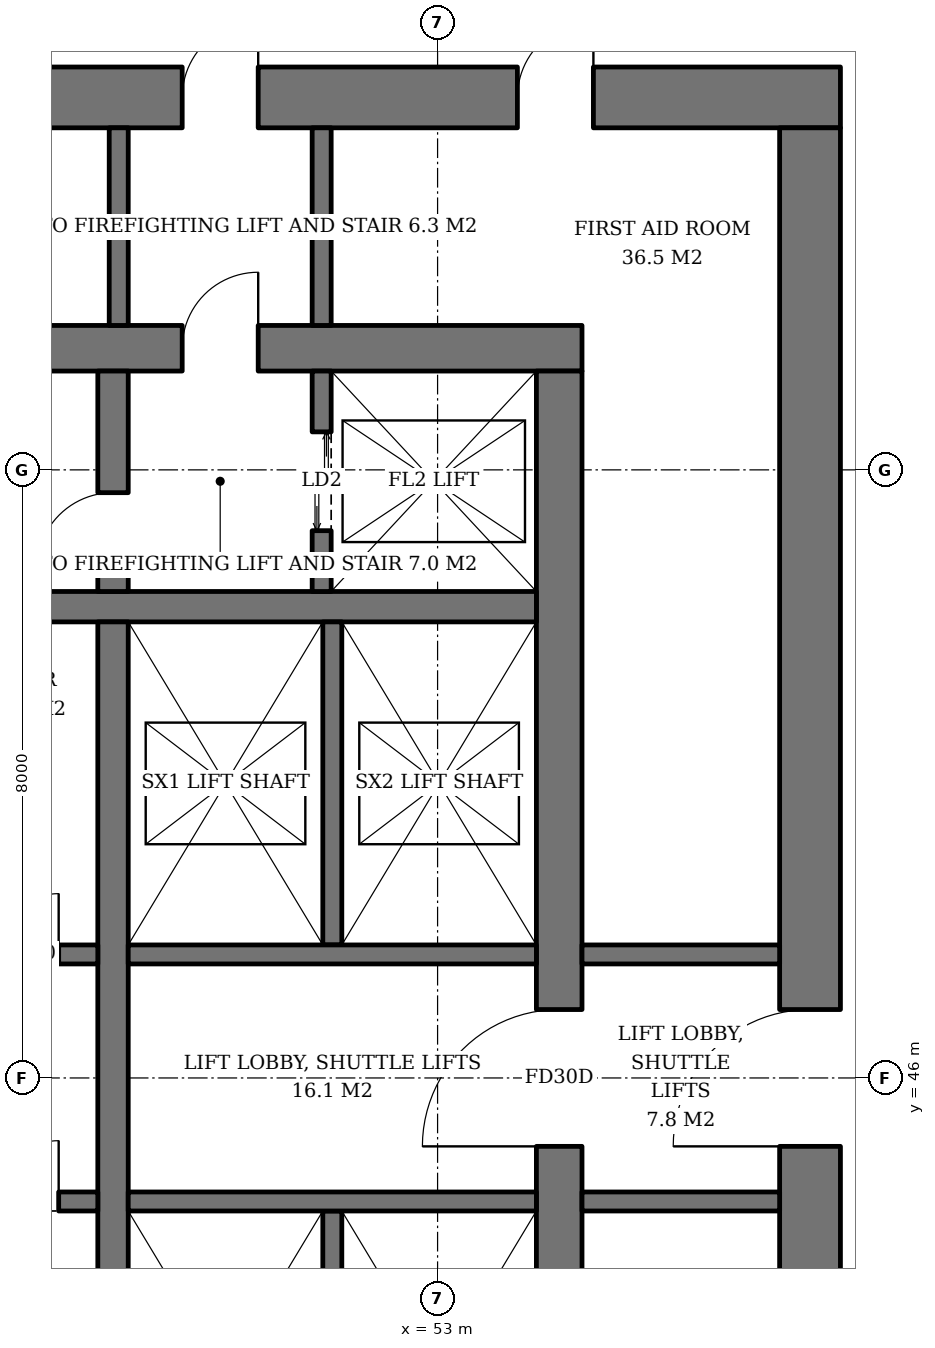
"""IFC4 building model, lengths in metres.
Left out: names, types, materials, properties, quantities, classifications, styles, units other than length and angle.
Written with IfcOpenShell. Run it as: python <this file> out.ifc"""

import sys

from ifc_helpers import new_model, si_unit, direction, frame, frame_2d, origin, place, context, subcontext, project, spatial, rectangle, extrude, element, fill, save


model = new_model("IFC4")
c1 = context("Model", 3, precision=1e-05, world=origin(), true_north=direction((0.0, 1.0)))
c2 = subcontext(c1, "Body", "Model", "MODEL_VIEW")
j1 = project(units=[si_unit("LENGTHUNIT", "METRE"), si_unit("PLANEANGLEUNIT", "RADIAN")], contexts=[c1])
p1 = place(None, origin())
s1 = spatial("IfcSite", under=j1, at=p1, CompositionType="ELEMENT")
p2 = place(p1, origin())
s2 = spatial("IfcBuilding", under=s1, at=p2, CompositionType="ELEMENT")
p3 = place(p2, frame((0.0, 0.0, 78.0)))
s3 = spatial("IfcBuildingStorey", under=s2, at=p3, CompositionType="ELEMENT", Elevation=78.0)
p4 = place(p3, frame((35.1, 55.6, 0.0), z_axis=(0.0, 0.0, 1.0), x_axis=(1.0, 0.0, 0.0)))
e1 = element("IfcWall", 1, at=p4, inside=s3, PredefinedType="SHEAR", context=c2, shape_type="SweptSolid", body=[
    extrude(rectangle(XDim=19.8, YDim=0.6, at=frame_2d((9.9, 0.0))), origin(), (0.0, 0.0, 1.0), 3.8),
])
p5 = place(p4, frame((14.54, 0.0, 0.0)))
e2 = element("IfcOpeningElement", 2, at=p5, cuts=e1, PredefinedType="OPENING", context=c2, shape_type="SweptSolid", body=[
    extrude(rectangle(XDim=1.0, YDim=2.1, at=frame_2d((0.5, 1.05))), frame((0.0, 0.31, 0.0), z_axis=(0.0, -1.0, 0.0), x_axis=(1.0, 0.0, 0.0)), (0.0, 0.0, 1.0), 0.62),
])
p6 = place(p4, frame((2.425, 0.0, 0.0)))
e3 = element("IfcOpeningElement", 3, at=p6, cuts=e1, PredefinedType="OPENING", context=c2, shape_type="SweptSolid", body=[
    extrude(rectangle(XDim=1.0, YDim=2.1, at=frame_2d((0.5, 1.05))), frame((0.0, 0.31, 0.0), z_axis=(0.0, -1.0, 0.0), x_axis=(1.0, 0.0, 0.0)), (0.0, 0.0, 1.0), 0.62),
])
p7 = place(p3, frame((54.6, 36.7, 0.0), z_axis=(0.0, 0.0, 1.0), x_axis=(0.0, 1.0, 0.0)))
e4 = element("IfcWall", 4, at=p7, inside=s3, PredefinedType="SHEAR", context=c2, shape_type="SweptSolid", body=[
    extrude(rectangle(XDim=18.6, YDim=0.6, at=frame_2d((9.3, 0.0))), origin(), (0.0, 0.0, 1.0), 3.8),
])
p8 = place(p7, frame((8.4, 0.0, 0.0)))
e5 = element("IfcOpeningElement", 5, at=p8, cuts=e4, PredefinedType="OPENING", context=c2, shape_type="SweptSolid", body=[
    extrude(rectangle(XDim=1.8, YDim=2.4, at=frame_2d((0.9, 1.2))), frame((0.0, 0.31, 0.0), z_axis=(0.0, -1.0, 0.0), x_axis=(1.0, 0.0, 0.0)), (0.0, 0.0, 1.0), 0.62),
])
p9 = place(p3, frame((31.7, 58.9, 0.0), z_axis=(0.0, 0.0, 1.0), x_axis=(1.0, 0.0, 0.0)))
e6 = element("IfcWall", 6, at=p9, inside=s3, PredefinedType="SHEAR", context=c2, shape_type="SweptSolid", body=[
    extrude(rectangle(XDim=26.6, YDim=0.8, at=frame_2d((13.3, 0.0))), origin(), (0.0, 0.0, 1.0), 3.8),
])
p10 = place(p9, frame((17.94, 0.0, 0.0)))
e7 = element("IfcOpeningElement", 7, at=p10, cuts=e6, PredefinedType="OPENING", context=c2, shape_type="SweptSolid", body=[
    extrude(rectangle(XDim=1.0, YDim=2.1, at=frame_2d((0.5, 1.05))), frame((0.0, 0.41, 0.0), z_axis=(0.0, -1.0, 0.0), x_axis=(1.0, 0.0, 0.0)), (0.0, 0.0, 1.0), 0.82),
])
p11 = place(p9, frame((5.825, 0.0, 0.0)))
e8 = element("IfcOpeningElement", 8, at=p11, cuts=e6, PredefinedType="OPENING", context=c2, shape_type="SweptSolid", body=[
    extrude(rectangle(XDim=1.0, YDim=2.1, at=frame_2d((0.5, 1.05))), frame((0.0, 0.41, 0.0), z_axis=(0.0, -1.0, 0.0), x_axis=(1.0, 0.0, 0.0)), (0.0, 0.0, 1.0), 0.82),
])
p12 = place(p9, frame((1.05, 0.0, 0.0)))
e9 = element("IfcOpeningElement", 9, at=p12, cuts=e6, PredefinedType="OPENING", context=c2, shape_type="SweptSolid", body=[
    extrude(rectangle(XDim=1.0, YDim=2.1, at=frame_2d((0.5, 1.05))), frame((0.0, 0.41, 0.0), z_axis=(0.0, -1.0, 0.0), x_axis=(1.0, 0.0, 0.0)), (0.0, 0.0, 1.0), 0.82),
])
p13 = place(p9, frame((2.637, 0.0, 0.0)))
e10 = element("IfcOpeningElement", 10, at=p13, cuts=e6, PredefinedType="OPENING", context=c2, shape_type="SweptSolid", body=[
    extrude(rectangle(XDim=1.0, YDim=2.1, at=frame_2d((0.5, 1.05))), frame((0.0, 0.41, 0.0), z_axis=(0.0, -1.0, 0.0), x_axis=(1.0, 0.0, 0.0)), (0.0, 0.0, 1.0), 0.82),
])
p14 = place(p9, frame((4.229, 0.0, 0.0)))
e11 = element("IfcOpeningElement", 11, at=p14, cuts=e6, PredefinedType="OPENING", context=c2, shape_type="SweptSolid", body=[
    extrude(rectangle(XDim=1.0, YDim=2.1, at=frame_2d((0.5, 1.05))), frame((0.0, 0.41, 0.0), z_axis=(0.0, -1.0, 0.0), x_axis=(1.0, 0.0, 0.0)), (0.0, 0.0, 1.0), 0.82),
])
p15 = place(p9, frame((8.44, 0.0, 0.0)))
e12 = element("IfcOpeningElement", 12, at=p15, cuts=e6, PredefinedType="OPENING", context=c2, shape_type="SweptSolid", body=[
    extrude(rectangle(XDim=1.0, YDim=2.1, at=frame_2d((0.5, 1.05))), frame((0.0, 0.41, 0.0), z_axis=(0.0, -1.0, 0.0), x_axis=(1.0, 0.0, 0.0)), (0.0, 0.0, 1.0), 0.82),
])
p16 = place(p9, frame((13.342, 0.0, 0.0)))
e13 = element("IfcOpeningElement", 13, at=p16, cuts=e6, PredefinedType="OPENING", context=c2, shape_type="SweptSolid", body=[
    extrude(rectangle(XDim=1.0, YDim=2.1, at=frame_2d((0.5, 1.05))), frame((0.0, 0.41, 0.0), z_axis=(0.0, -1.0, 0.0), x_axis=(1.0, 0.0, 0.0)), (0.0, 0.0, 1.0), 0.82),
])
p17 = place(p9, frame((22.35, 0.0, 0.0)))
e14 = element("IfcOpeningElement", 14, at=p17, cuts=e6, PredefinedType="OPENING", context=c2, shape_type="SweptSolid", body=[
    extrude(rectangle(XDim=1.0, YDim=2.1, at=frame_2d((0.5, 1.05))), frame((0.0, 0.41, 0.0), z_axis=(0.0, -1.0, 0.0), x_axis=(1.0, 0.0, 0.0)), (0.0, 0.0, 1.0), 0.82),
])
p18 = place(p3, frame((57.9, 33.5, 0.0), z_axis=(0.0, 0.0, 1.0), x_axis=(0.0, 1.0, 0.0)))
e15 = element("IfcWall", 15, at=p18, inside=s3, PredefinedType="SHEAR", context=c2, shape_type="SweptSolid", body=[
    extrude(rectangle(XDim=25.0, YDim=0.8, at=frame_2d((12.5, 0.0))), origin(), (0.0, 0.0, 1.0), 3.8),
])
p19 = place(p18, frame((11.6, 0.0, 0.0)))
e16 = element("IfcOpeningElement", 16, at=p19, cuts=e15, PredefinedType="OPENING", context=c2, shape_type="SweptSolid", body=[
    extrude(rectangle(XDim=1.8, YDim=2.4, at=frame_2d((0.9, 1.2))), frame((0.0, 0.41, 0.0), z_axis=(0.0, -1.0, 0.0), x_axis=(1.0, 0.0, 0.0)), (0.0, 0.0, 1.0), 0.82),
])
p20 = place(p3, frame((35.7, 52.2, 0.0), z_axis=(0.0, 0.0, 1.0), x_axis=(1.0, 0.0, 0.0)))
e17 = element("IfcWall", 17, at=p20, inside=s3, PredefinedType="SHEAR", context=c2, shape_type="SweptSolid", body=[
    extrude(rectangle(XDim=18.6, YDim=0.4, at=frame_2d((9.3, 0.0))), origin(), (0.0, 0.0, 1.0), 3.8),
])
p21 = place(p3, frame((48.73, 40.0, 0.0), z_axis=(0.0, 0.0, 1.0), x_axis=(0.0, 1.0, 0.0)))
e18 = element("IfcWall", 18, at=p21, inside=s3, PredefinedType="SHEAR", context=c2, shape_type="SweptSolid", body=[
    extrude(rectangle(XDim=12.0, YDim=0.4, at=frame_2d((6.0, 0.0))), origin(), (0.0, 0.0, 1.0), 3.8),
])
p22 = place(p3, frame((48.73, 52.4, 0.0), z_axis=(0.0, 0.0, 1.0), x_axis=(0.0, 1.0, 0.0)))
e19 = element("IfcWall", 19, at=p22, inside=s3, PredefinedType="SHEAR", context=c2, shape_type="SweptSolid", body=[
    extrude(rectangle(XDim=2.9, YDim=0.4, at=frame_2d((1.45, 0.0))), origin(), (0.0, 0.0, 1.0), 3.8),
])
p23 = place(p22, frame((0.3, 0.0, 0.0)))
e20 = element("IfcOpeningElement", 20, at=p23, cuts=e19, PredefinedType="OPENING", context=c2, shape_type="SweptSolid", body=[
    extrude(rectangle(XDim=1.0, YDim=2.1, at=frame_2d((0.5, 1.05))), frame((0.0, 0.21, 0.0), z_axis=(0.0, -1.0, 0.0), x_axis=(1.0, 0.0, 0.0)), (0.0, 0.0, 1.0), 0.42),
])
p24 = place(p3, frame((51.475, 52.4, 0.0), z_axis=(0.0, 0.0, 1.0), x_axis=(0.0, 1.0, 0.0)))
e21 = element("IfcWall", 21, at=p24, inside=s3, PredefinedType="SHEAR", context=c2, shape_type="SweptSolid", body=[
    extrude(rectangle(XDim=2.9, YDim=0.25, at=frame_2d((1.45, 0.0))), origin(), (0.0, 0.0, 1.0), 3.8),
])
p25 = place(p24, frame((0.8, 0.0, 0.0)))
e22 = element("IfcOpeningElement", 22, at=p25, cuts=e21, PredefinedType="OPENING", context=c2, shape_type="SweptSolid", body=[
    extrude(rectangle(XDim=1.3, YDim=2.2, at=frame_2d((0.65, 1.1))), frame((0.0, 0.135, 0.0), z_axis=(0.0, -1.0, 0.0), x_axis=(1.0, 0.0, 0.0)), (0.0, 0.0, 1.0), 0.27),
])
p26 = place(p3, frame((35.7, 47.625, 0.0), z_axis=(0.0, 0.0, 1.0), x_axis=(1.0, 0.0, 0.0)))
e23 = element("IfcWall", 23, at=p26, inside=s3, PredefinedType="SHEAR", context=c2, shape_type="SweptSolid", body=[
    extrude(rectangle(XDim=12.83, YDim=0.25, at=frame_2d((6.415, 0.0))), origin(), (0.0, 0.0, 1.0), 3.8),
])
p27 = place(p26, frame((0.7, 0.0, 0.0)))
e24 = element("IfcOpeningElement", 24, at=p27, cuts=e23, PredefinedType="OPENING", context=c2, shape_type="SweptSolid", body=[
    extrude(rectangle(XDim=1.1, YDim=2.2, at=frame_2d((0.55, 1.1))), frame((0.0, 0.135, 0.0), z_axis=(0.0, -1.0, 0.0), x_axis=(1.0, 0.0, 0.0)), (0.0, 0.0, 1.0), 0.27),
])
p28 = place(p26, frame((3.45, 0.0, 0.0)))
e25 = element("IfcOpeningElement", 25, at=p28, cuts=e23, PredefinedType="OPENING", context=c2, shape_type="SweptSolid", body=[
    extrude(rectangle(XDim=1.1, YDim=2.2, at=frame_2d((0.55, 1.1))), frame((0.0, 0.135, 0.0), z_axis=(0.0, -1.0, 0.0), x_axis=(1.0, 0.0, 0.0)), (0.0, 0.0, 1.0), 0.27),
])
p29 = place(p26, frame((6.2, 0.0, 0.0)))
e26 = element("IfcOpeningElement", 26, at=p29, cuts=e23, PredefinedType="OPENING", context=c2, shape_type="SweptSolid", body=[
    extrude(rectangle(XDim=1.1, YDim=2.2, at=frame_2d((0.55, 1.1))), frame((0.0, 0.135, 0.0), z_axis=(0.0, -1.0, 0.0), x_axis=(1.0, 0.0, 0.0)), (0.0, 0.0, 1.0), 0.27),
])
p30 = place(p26, frame((8.95, 0.0, 0.0)))
e27 = element("IfcOpeningElement", 27, at=p30, cuts=e23, PredefinedType="OPENING", context=c2, shape_type="SweptSolid", body=[
    extrude(rectangle(XDim=1.1, YDim=2.2, at=frame_2d((0.55, 1.1))), frame((0.0, 0.135, 0.0), z_axis=(0.0, -1.0, 0.0), x_axis=(1.0, 0.0, 0.0)), (0.0, 0.0, 1.0), 0.27),
])
p31 = place(p26, frame((11.515, 0.0, 0.0)))
e28 = element("IfcOpeningElement", 28, at=p31, cuts=e23, PredefinedType="OPENING", context=c2, shape_type="SweptSolid", body=[
    extrude(rectangle(XDim=0.8, YDim=2.0, at=frame_2d((0.4, 1.0))), frame((0.0, 0.135, 0.0), z_axis=(0.0, -1.0, 0.0), x_axis=(1.0, 0.0, 0.0)), (0.0, 0.0, 1.0), 0.27),
])
p32 = place(p3, frame((35.7, 44.375, 0.0), z_axis=(0.0, 0.0, 1.0), x_axis=(1.0, 0.0, 0.0)))
e29 = element("IfcWall", 29, at=p32, inside=s3, PredefinedType="SHEAR", context=c2, shape_type="SweptSolid", body=[
    extrude(rectangle(XDim=12.83, YDim=0.25, at=frame_2d((6.415, 0.0))), origin(), (0.0, 0.0, 1.0), 3.8),
])
p33 = place(p32, frame((0.7, 0.0, 0.0)))
e30 = element("IfcOpeningElement", 30, at=p33, cuts=e29, PredefinedType="OPENING", context=c2, shape_type="SweptSolid", body=[
    extrude(rectangle(XDim=1.1, YDim=2.2, at=frame_2d((0.55, 1.1))), frame((0.0, 0.135, 0.0), z_axis=(0.0, -1.0, 0.0), x_axis=(1.0, 0.0, 0.0)), (0.0, 0.0, 1.0), 0.27),
])
p34 = place(p32, frame((3.45, 0.0, 0.0)))
e31 = element("IfcOpeningElement", 31, at=p34, cuts=e29, PredefinedType="OPENING", context=c2, shape_type="SweptSolid", body=[
    extrude(rectangle(XDim=1.1, YDim=2.2, at=frame_2d((0.55, 1.1))), frame((0.0, 0.135, 0.0), z_axis=(0.0, -1.0, 0.0), x_axis=(1.0, 0.0, 0.0)), (0.0, 0.0, 1.0), 0.27),
])
p35 = place(p32, frame((6.2, 0.0, 0.0)))
e32 = element("IfcOpeningElement", 32, at=p35, cuts=e29, PredefinedType="OPENING", context=c2, shape_type="SweptSolid", body=[
    extrude(rectangle(XDim=1.1, YDim=2.2, at=frame_2d((0.55, 1.1))), frame((0.0, 0.135, 0.0), z_axis=(0.0, -1.0, 0.0), x_axis=(1.0, 0.0, 0.0)), (0.0, 0.0, 1.0), 0.27),
])
p36 = place(p32, frame((8.95, 0.0, 0.0)))
e33 = element("IfcOpeningElement", 33, at=p36, cuts=e29, PredefinedType="OPENING", context=c2, shape_type="SweptSolid", body=[
    extrude(rectangle(XDim=1.1, YDim=2.2, at=frame_2d((0.55, 1.1))), frame((0.0, 0.135, 0.0), z_axis=(0.0, -1.0, 0.0), x_axis=(1.0, 0.0, 0.0)), (0.0, 0.0, 1.0), 0.27),
])
p37 = place(p32, frame((11.515, 0.0, 0.0)))
e34 = element("IfcOpeningElement", 34, at=p37, cuts=e29, PredefinedType="OPENING", context=c2, shape_type="SweptSolid", body=[
    extrude(rectangle(XDim=0.8, YDim=2.0, at=frame_2d((0.4, 1.0))), frame((0.0, 0.135, 0.0), z_axis=(0.0, -1.0, 0.0), x_axis=(1.0, 0.0, 0.0)), (0.0, 0.0, 1.0), 0.27),
])
p38 = place(p3, frame((51.615, 47.75, 0.0), z_axis=(0.0, 0.0, 1.0), x_axis=(0.0, 1.0, 0.0)))
e35 = element("IfcWall", 35, at=p38, inside=s3, PredefinedType="SHEAR", context=c2, shape_type="SweptSolid", body=[
    extrude(rectangle(XDim=4.25, YDim=0.25, at=frame_2d((2.125, 0.0))), origin(), (0.0, 0.0, 1.0), 3.8),
])
p39 = place(p3, frame((48.93, 47.625, 0.0), z_axis=(0.0, 0.0, 1.0), x_axis=(1.0, 0.0, 0.0)))
e36 = element("IfcWall", 36, at=p39, inside=s3, PredefinedType="SHEAR", context=c2, shape_type="SweptSolid", body=[
    extrude(rectangle(XDim=5.37, YDim=0.25, at=frame_2d((2.685, 0.0))), origin(), (0.0, 0.0, 1.0), 3.8),
])
p40 = place(p3, frame((51.615, 44.25, 0.0), z_axis=(0.0, 0.0, 1.0), x_axis=(0.0, -1.0, 0.0)))
e37 = element("IfcWall", 37, at=p40, inside=s3, PredefinedType="SHEAR", context=c2, shape_type="SweptSolid", body=[
    extrude(rectangle(XDim=4.25, YDim=0.25, at=frame_2d((2.125, 0.0))), origin(), (0.0, 0.0, 1.0), 3.8),
])
p41 = place(p3, frame((48.93, 44.375, 0.0), z_axis=(0.0, 0.0, 1.0), x_axis=(1.0, 0.0, 0.0)))
e38 = element("IfcWall", 38, at=p41, inside=s3, PredefinedType="SHEAR", context=c2, shape_type="SweptSolid", body=[
    extrude(rectangle(XDim=5.37, YDim=0.25, at=frame_2d((2.685, 0.0))), origin(), (0.0, 0.0, 1.0), 3.8),
])
for number, where, z_axis, x_axis in (
    (39, (48.805, 55.9, 0.0), (0.0, 0.0, 1.0), (0.0, 1.0, 0.0)),
    (40, (51.475, 55.9, 0.0), (0.0, 0.0, 1.0), (0.0, 1.0, 0.0)),
    (41, (54.9, 44.375, 0.0), (0.0, 0.0, 1.0), (1.0, 0.0, 0.0)),
    (42, (54.9, 47.625, 0.0), (0.0, 0.0, 1.0), (1.0, 0.0, 0.0)),
):
    element("IfcWall", number, at=place(p3, frame(where, z_axis=z_axis, x_axis=x_axis)), inside=s3, PredefinedType="SOLIDWALL", context=c2, shape_type="SweptSolid", body=[
        extrude(rectangle(XDim=2.6, YDim=0.25, at=frame_2d((1.3, 0.0))), origin(), (0.0, 0.0, 1.0), 3.52),
    ])
p42 = place(p25, origin())
e43 = element("IfcDoor", 43, at=p42, inside=s3, OperationType="DOUBLE_DOOR_SLIDING", PredefinedType="DOOR", context=c2, shape_type="SweptSolid", body=[
    extrude(rectangle(XDim=1.3, YDim=2.2, at=frame_2d((0.65, 1.1))), frame((0.0, 0.025, 0.0), z_axis=(0.0, -1.0, 0.0), x_axis=(1.0, 0.0, 0.0)), (0.0, 0.0, 1.0), 0.05),
])
fill(e22, e43)
p43 = place(p31, origin())
e44 = element("IfcDoor", 44, at=p43, inside=s3, OperationType="SINGLE_SWING_RIGHT", PredefinedType="DOOR", context=c2, shape_type="SweptSolid", body=[
    extrude(rectangle(XDim=0.8, YDim=2.0, at=frame_2d((0.4, 1.0))), frame((0.0, 0.025, 0.0), z_axis=(0.0, -1.0, 0.0), x_axis=(1.0, 0.0, 0.0)), (0.0, 0.0, 1.0), 0.05),
])
fill(e28, e44)
p44 = place(p37, origin())
e45 = element("IfcDoor", 45, at=p44, inside=s3, OperationType="SINGLE_SWING_RIGHT", PredefinedType="DOOR", context=c2, shape_type="SweptSolid", body=[
    extrude(rectangle(XDim=0.8, YDim=2.0, at=frame_2d((0.4, 1.0))), frame((0.0, 0.025, 0.0), z_axis=(0.0, -1.0, 0.0), x_axis=(1.0, 0.0, 0.0)), (0.0, 0.0, 1.0), 0.05),
])
fill(e34, e45)
p45 = place(p23, origin())
e46 = element("IfcDoor", 46, at=p45, inside=s3, OperationType="SINGLE_SWING_LEFT", PredefinedType="DOOR", context=c2, shape_type="SweptSolid", body=[
    extrude(rectangle(XDim=1.0, YDim=2.1, at=frame_2d((0.5, 1.05))), frame((0.0, 0.025, 0.0), z_axis=(0.0, -1.0, 0.0), x_axis=(1.0, 0.0, 0.0)), (0.0, 0.0, 1.0), 0.05),
])
fill(e20, e46)
p46 = place(p5, origin())
e47 = element("IfcDoor", 47, at=p46, inside=s3, OperationType="SINGLE_SWING_RIGHT", PredefinedType="DOOR", context=c2, shape_type="SweptSolid", body=[
    extrude(rectangle(XDim=1.0, YDim=2.1, at=frame_2d((0.5, 1.05))), frame((0.0, 0.025, 0.0), z_axis=(0.0, -1.0, 0.0), x_axis=(1.0, 0.0, 0.0)), (0.0, 0.0, 1.0), 0.05),
])
fill(e2, e47)
p47 = place(p8, origin())
e48 = element("IfcDoor", 48, at=p47, inside=s3, OperationType="DOUBLE_DOOR_SINGLE_SWING", PredefinedType="DOOR", context=c2, shape_type="SweptSolid", body=[
    extrude(rectangle(XDim=1.8, YDim=2.4, at=frame_2d((0.9, 1.2))), frame((0.0, 0.025, 0.0), z_axis=(0.0, -1.0, 0.0), x_axis=(1.0, 0.0, 0.0)), (0.0, 0.0, 1.0), 0.05),
])
fill(e5, e48)
p48 = place(p19, origin())
e49 = element("IfcDoor", 49, at=p48, inside=s3, OperationType="DOUBLE_DOOR_SINGLE_SWING", PredefinedType="DOOR", context=c2, shape_type="SweptSolid", body=[
    extrude(rectangle(XDim=1.8, YDim=2.4, at=frame_2d((0.9, 1.2))), frame((0.0, 0.025, 0.0), z_axis=(0.0, -1.0, 0.0), x_axis=(1.0, 0.0, 0.0)), (0.0, 0.0, 1.0), 0.05),
])
fill(e16, e49)
p49 = place(p10, origin())
e50 = element("IfcDoor", 50, at=p49, inside=s3, OperationType="SINGLE_SWING_RIGHT", PredefinedType="DOOR", context=c2, shape_type="SweptSolid", body=[
    extrude(rectangle(XDim=1.0, YDim=2.1, at=frame_2d((0.5, 1.05))), frame((0.0, 0.025, 0.0), z_axis=(0.0, -1.0, 0.0), x_axis=(1.0, 0.0, 0.0)), (0.0, 0.0, 1.0), 0.05),
])
fill(e7, e50)
p50 = place(p17, origin())
e51 = element("IfcDoor", 51, at=p50, inside=s3, OperationType="SINGLE_SWING_RIGHT", PredefinedType="DOOR", context=c2, shape_type="SweptSolid", body=[
    extrude(rectangle(XDim=1.0, YDim=2.1, at=frame_2d((0.5, 1.05))), frame((0.0, -0.34, 0.0), z_axis=(0.0, -1.0, 0.0), x_axis=(1.0, 0.0, 0.0)), (0.0, 0.0, 1.0), 0.05),
])
fill(e14, e51)
save(model, sys.argv[1])
